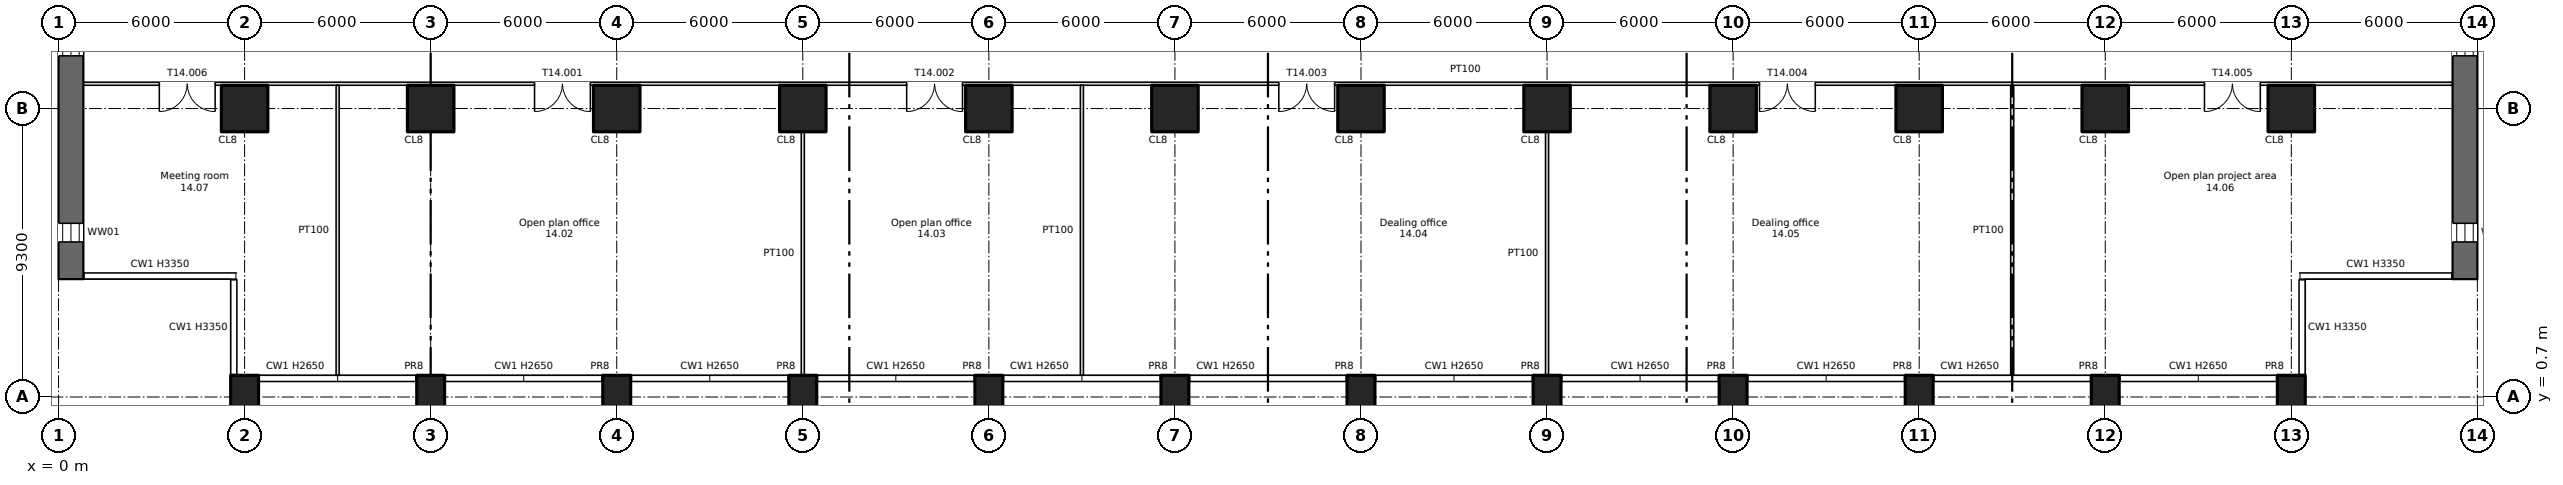
"""IFC4 building model, lengths in metres.
Left out: names, types, materials, properties, quantities, classifications, styles, units other than length and angle.
Written with IfcOpenShell. Run it as: python <this file> out.ifc"""

import sys

from ifc_helpers import new_model, si_unit, direction, frame, frame_2d, origin, origin_2d, place, context, subcontext, project, spatial, rectangle, extrude, element, fill, save


model = new_model("IFC4")
c1 = context("Model", 3, precision=1e-05, world=origin(), true_north=direction((0.0, 1.0)))
c2 = subcontext(c1, "Body", "Model", "MODEL_VIEW")
j1 = project(units=[si_unit("LENGTHUNIT", "METRE"), si_unit("PLANEANGLEUNIT", "RADIAN")], contexts=[c1])
p1 = place(None, origin())
s1 = spatial("IfcSite", under=j1, at=p1, CompositionType="ELEMENT")
p2 = place(p1, origin())
s2 = spatial("IfcBuilding", under=s1, at=p2, CompositionType="ELEMENT")
p3 = place(p2, frame((0.0, 0.0, 78.75)))
s3 = spatial("IfcBuildingStorey", under=s2, at=p3, CompositionType="ELEMENT", Elevation=78.75)
for number, where, z_axis, x_axis in (
    (1, (6.0, 0.7, -0.4), (0.0, 0.0, 1.0), (1.0, 0.0, 0.0)),
    (2, (12.0, 0.7, -0.4), (0.0, 0.0, 1.0), (1.0, 0.0, 0.0)),
    (3, (18.0, 0.7, -0.4), (0.0, 0.0, 1.0), (1.0, 0.0, 0.0)),
    (4, (24.0, 0.7, -0.4), (0.0, 0.0, 1.0), (1.0, 0.0, 0.0)),
    (5, (30.0, 0.7, -0.4), (0.0, 0.0, 1.0), (1.0, 0.0, 0.0)),
    (6, (36.0, 0.7, -0.4), (0.0, 0.0, 1.0), (1.0, 0.0, 0.0)),
    (7, (42.0, 0.7, -0.4), (0.0, 0.0, 1.0), (1.0, 0.0, 0.0)),
    (8, (48.0, 0.7, -0.4), (0.0, 0.0, 1.0), (1.0, 0.0, 0.0)),
    (9, (54.0, 0.7, -0.4), (0.0, 0.0, 1.0), (1.0, 0.0, 0.0)),
    (10, (60.0, 0.7, -0.4), (0.0, 0.0, 1.0), (1.0, 0.0, 0.0)),
    (11, (66.0, 0.7, -0.4), (0.0, 0.0, 1.0), (1.0, 0.0, 0.0)),
    (12, (72.0, 0.7, -0.4), (0.0, 0.0, 1.0), (1.0, 0.0, 0.0)),
):
    element("IfcColumn", number, at=place(p3, frame(where, z_axis=z_axis, x_axis=x_axis)), inside=s3, PredefinedType="COLUMN", context=c2, shape_type="SweptSolid", body=[
        extrude(rectangle(XDim=0.9, YDim=1.4, at=origin_2d()), origin(), (0.0, 0.0, 1.0), 3.75),
    ])
for number, where, z_axis, x_axis in (
    (13, (6.0, 10.0, 0.0), (0.0, 0.0, 1.0), (1.0, 0.0, 0.0)),
    (14, (12.0, 10.0, 0.0), (0.0, 0.0, 1.0), (1.0, 0.0, 0.0)),
    (15, (18.0, 10.0, 0.0), (0.0, 0.0, 1.0), (1.0, 0.0, 0.0)),
    (16, (24.0, 10.0, 0.0), (0.0, 0.0, 1.0), (1.0, 0.0, 0.0)),
    (17, (30.0, 10.0, 0.0), (0.0, 0.0, 1.0), (1.0, 0.0, 0.0)),
    (18, (36.0, 10.0, 0.0), (0.0, 0.0, 1.0), (1.0, 0.0, 0.0)),
    (19, (42.0, 10.0, 0.0), (0.0, 0.0, 1.0), (1.0, 0.0, 0.0)),
    (20, (48.0, 10.0, 0.0), (0.0, 0.0, 1.0), (1.0, 0.0, 0.0)),
    (21, (54.0, 10.0, 0.0), (0.0, 0.0, 1.0), (1.0, 0.0, 0.0)),
    (22, (60.0, 10.0, 0.0), (0.0, 0.0, 1.0), (1.0, 0.0, 0.0)),
    (23, (66.0, 10.0, 0.0), (0.0, 0.0, 1.0), (1.0, 0.0, 0.0)),
    (24, (72.0, 10.0, 0.0), (0.0, 0.0, 1.0), (1.0, 0.0, 0.0)),
):
    element("IfcColumn", number, at=place(p3, frame(where, z_axis=z_axis, x_axis=x_axis)), inside=s3, PredefinedType="COLUMN", context=c2, shape_type="SweptSolid", body=[
        extrude(rectangle(XDim=1.5, YDim=1.5, at=origin_2d()), origin(), (0.0, 0.0, 1.0), 3.35),
    ])
p4 = place(p3, frame((0.4, 4.5, 0.0), z_axis=(0.0, 0.0, 1.0), x_axis=(0.0, 1.0, 0.0)))
e25 = element("IfcWall", 25, at=p4, inside=s3, PredefinedType="SHEAR", context=c2, shape_type="SweptSolid", body=[
    extrude(rectangle(XDim=37.0, YDim=0.8, at=frame_2d((18.5, 0.0))), origin(), (0.0, 0.0, 1.0), 3.35),
])
p5 = place(p4, frame((1.2, 0.0, 0.6)))
e26 = element("IfcOpeningElement", 26, at=p5, cuts=e25, PredefinedType="OPENING", context=c2, shape_type="SweptSolid", body=[
    extrude(rectangle(XDim=0.6, YDim=2.4, at=frame_2d((0.3, 1.2))), frame((0.0, 0.41, 0.0), z_axis=(0.0, -1.0, 0.0), x_axis=(1.0, 0.0, 0.0)), (0.0, 0.0, 1.0), 0.82),
])
p6 = place(p4, frame((7.2, 0.0, 0.6)))
e27 = element("IfcOpeningElement", 27, at=p6, cuts=e25, PredefinedType="OPENING", context=c2, shape_type="SweptSolid", body=[
    extrude(rectangle(XDim=0.6, YDim=2.4, at=frame_2d((0.3, 1.2))), frame((0.0, 0.41, 0.0), z_axis=(0.0, -1.0, 0.0), x_axis=(1.0, 0.0, 0.0)), (0.0, 0.0, 1.0), 0.82),
])
p7 = place(p4, frame((13.2, 0.0, 0.6)))
e28 = element("IfcOpeningElement", 28, at=p7, cuts=e25, PredefinedType="OPENING", context=c2, shape_type="SweptSolid", body=[
    extrude(rectangle(XDim=0.6, YDim=2.4, at=frame_2d((0.3, 1.2))), frame((0.0, 0.41, 0.0), z_axis=(0.0, -1.0, 0.0), x_axis=(1.0, 0.0, 0.0)), (0.0, 0.0, 1.0), 0.82),
])
p8 = place(p4, frame((19.2, 0.0, 0.6)))
e29 = element("IfcOpeningElement", 29, at=p8, cuts=e25, PredefinedType="OPENING", context=c2, shape_type="SweptSolid", body=[
    extrude(rectangle(XDim=0.6, YDim=2.4, at=frame_2d((0.3, 1.2))), frame((0.0, 0.41, 0.0), z_axis=(0.0, -1.0, 0.0), x_axis=(1.0, 0.0, 0.0)), (0.0, 0.0, 1.0), 0.82),
])
p9 = place(p3, frame((77.6, 4.5, 0.0), z_axis=(0.0, 0.0, 1.0), x_axis=(0.0, 1.0, 0.0)))
e30 = element("IfcWall", 30, at=p9, inside=s3, PredefinedType="SHEAR", context=c2, shape_type="SweptSolid", body=[
    extrude(rectangle(XDim=37.0, YDim=0.8, at=frame_2d((18.5, 0.0))), origin(), (0.0, 0.0, 1.0), 3.35),
])
p10 = place(p9, frame((1.2, 0.0, 0.6)))
e31 = element("IfcOpeningElement", 31, at=p10, cuts=e30, PredefinedType="OPENING", context=c2, shape_type="SweptSolid", body=[
    extrude(rectangle(XDim=0.6, YDim=2.4, at=frame_2d((0.3, 1.2))), frame((0.0, 0.41, 0.0), z_axis=(0.0, -1.0, 0.0), x_axis=(1.0, 0.0, 0.0)), (0.0, 0.0, 1.0), 0.82),
])
p11 = place(p9, frame((7.2, 0.0, 0.6)))
e32 = element("IfcOpeningElement", 32, at=p11, cuts=e30, PredefinedType="OPENING", context=c2, shape_type="SweptSolid", body=[
    extrude(rectangle(XDim=0.6, YDim=2.4, at=frame_2d((0.3, 1.2))), frame((0.0, 0.41, 0.0), z_axis=(0.0, -1.0, 0.0), x_axis=(1.0, 0.0, 0.0)), (0.0, 0.0, 1.0), 0.82),
])
p12 = place(p9, frame((13.2, 0.0, 0.6)))
e33 = element("IfcOpeningElement", 33, at=p12, cuts=e30, PredefinedType="OPENING", context=c2, shape_type="SweptSolid", body=[
    extrude(rectangle(XDim=0.6, YDim=2.4, at=frame_2d((0.3, 1.2))), frame((0.0, 0.41, 0.0), z_axis=(0.0, -1.0, 0.0), x_axis=(1.0, 0.0, 0.0)), (0.0, 0.0, 1.0), 0.82),
])
p13 = place(p9, frame((19.2, 0.0, 0.6)))
e34 = element("IfcOpeningElement", 34, at=p13, cuts=e30, PredefinedType="OPENING", context=c2, shape_type="SweptSolid", body=[
    extrude(rectangle(XDim=0.6, YDim=2.4, at=frame_2d((0.3, 1.2))), frame((0.0, 0.41, 0.0), z_axis=(0.0, -1.0, 0.0), x_axis=(1.0, 0.0, 0.0)), (0.0, 0.0, 1.0), 0.82),
])
p14 = place(p9, frame((25.2, 0.0, 0.6)))
e35 = element("IfcOpeningElement", 35, at=p14, cuts=e30, PredefinedType="OPENING", context=c2, shape_type="SweptSolid", body=[
    extrude(rectangle(XDim=0.6, YDim=2.4, at=frame_2d((0.3, 1.2))), frame((0.0, 0.41, 0.0), z_axis=(0.0, -1.0, 0.0), x_axis=(1.0, 0.0, 0.0)), (0.0, 0.0, 1.0), 0.82),
])
p15 = place(p9, frame((31.2, 0.0, 0.6)))
e36 = element("IfcOpeningElement", 36, at=p15, cuts=e30, PredefinedType="OPENING", context=c2, shape_type="SweptSolid", body=[
    extrude(rectangle(XDim=0.6, YDim=2.4, at=frame_2d((0.3, 1.2))), frame((0.0, 0.41, 0.0), z_axis=(0.0, -1.0, 0.0), x_axis=(1.0, 0.0, 0.0)), (0.0, 0.0, 1.0), 0.82),
])
p16 = place(p3, frame((0.8, 10.8, 0.0), z_axis=(0.0, 0.0, 1.0), x_axis=(1.0, 0.0, 0.0)))
e37 = element("IfcWall", 37, at=p16, inside=s3, PredefinedType="PARTITIONING", context=c2, shape_type="SweptSolid", body=[
    extrude(rectangle(XDim=76.4, YDim=0.1, at=frame_2d((38.2, 0.0))), origin(), (0.0, 0.0, 1.0), 3.35),
])
p17 = place(p16, frame((14.55, 0.0, 0.0)))
e38 = element("IfcOpeningElement", 38, at=p17, cuts=e37, PredefinedType="OPENING", context=c2, shape_type="SweptSolid", body=[
    extrude(rectangle(XDim=1.8, YDim=2.1, at=frame_2d((0.9, 1.05))), frame((0.0, 0.06, 0.0), z_axis=(0.0, -1.0, 0.0), x_axis=(1.0, 0.0, 0.0)), (0.0, 0.0, 1.0), 0.12),
])
p18 = place(p16, frame((26.55, 0.0, 0.0)))
e39 = element("IfcOpeningElement", 39, at=p18, cuts=e37, PredefinedType="OPENING", context=c2, shape_type="SweptSolid", body=[
    extrude(rectangle(XDim=1.8, YDim=2.1, at=frame_2d((0.9, 1.05))), frame((0.0, 0.06, 0.0), z_axis=(0.0, -1.0, 0.0), x_axis=(1.0, 0.0, 0.0)), (0.0, 0.0, 1.0), 0.12),
])
p19 = place(p16, frame((38.55, 0.0, 0.0)))
e40 = element("IfcOpeningElement", 40, at=p19, cuts=e37, PredefinedType="OPENING", context=c2, shape_type="SweptSolid", body=[
    extrude(rectangle(XDim=1.8, YDim=2.1, at=frame_2d((0.9, 1.05))), frame((0.0, 0.06, 0.0), z_axis=(0.0, -1.0, 0.0), x_axis=(1.0, 0.0, 0.0)), (0.0, 0.0, 1.0), 0.12),
])
p20 = place(p16, frame((54.05, 0.0, 0.0)))
e41 = element("IfcOpeningElement", 41, at=p20, cuts=e37, PredefinedType="OPENING", context=c2, shape_type="SweptSolid", body=[
    extrude(rectangle(XDim=1.8, YDim=2.1, at=frame_2d((0.9, 1.05))), frame((0.0, 0.06, 0.0), z_axis=(0.0, -1.0, 0.0), x_axis=(1.0, 0.0, 0.0)), (0.0, 0.0, 1.0), 0.12),
])
p21 = place(p16, frame((68.4, 0.0, 0.0)))
e42 = element("IfcOpeningElement", 42, at=p21, cuts=e37, PredefinedType="OPENING", context=c2, shape_type="SweptSolid", body=[
    extrude(rectangle(XDim=1.8, YDim=2.1, at=frame_2d((0.9, 1.05))), frame((0.0, 0.06, 0.0), z_axis=(0.0, -1.0, 0.0), x_axis=(1.0, 0.0, 0.0)), (0.0, 0.0, 1.0), 0.12),
])
p22 = place(p16, frame((2.45, 0.0, 0.0)))
e43 = element("IfcOpeningElement", 43, at=p22, cuts=e37, PredefinedType="OPENING", context=c2, shape_type="SweptSolid", body=[
    extrude(rectangle(XDim=1.8, YDim=2.1, at=frame_2d((0.9, 1.05))), frame((0.0, 0.06, 0.0), z_axis=(0.0, -1.0, 0.0), x_axis=(1.0, 0.0, 0.0)), (0.0, 0.0, 1.0), 0.12),
])
p23 = place(p3, frame((9.0, 1.4, 0.0), z_axis=(0.0, 0.0, 1.0), x_axis=(0.0, 1.0, 0.0)))
e44 = element("IfcWall", 44, at=p23, inside=s3, PredefinedType="PARTITIONING", context=c2, shape_type="SweptSolid", body=[
    extrude(rectangle(XDim=9.35, YDim=0.1, at=frame_2d((4.675, 0.0))), origin(), (0.0, 0.0, 1.0), 3.35),
])
p24 = place(p3, frame((24.0, 1.4, 0.0), z_axis=(0.0, 0.0, 1.0), x_axis=(0.0, 1.0, 0.0)))
e45 = element("IfcWall", 45, at=p24, inside=s3, PredefinedType="PARTITIONING", context=c2, shape_type="SweptSolid", body=[
    extrude(rectangle(XDim=7.85, YDim=0.1, at=frame_2d((3.925, 0.0))), origin(), (0.0, 0.0, 1.0), 3.35),
])
p25 = place(p3, frame((33.0, 1.4, 0.0), z_axis=(0.0, 0.0, 1.0), x_axis=(0.0, 1.0, 0.0)))
e46 = element("IfcWall", 46, at=p25, inside=s3, PredefinedType="PARTITIONING", context=c2, shape_type="SweptSolid", body=[
    extrude(rectangle(XDim=9.35, YDim=0.1, at=frame_2d((4.675, 0.0))), origin(), (0.0, 0.0, 1.0), 3.35),
])
p26 = place(p3, frame((48.0, 1.4, 0.0), z_axis=(0.0, 0.0, 1.0), x_axis=(0.0, 1.0, 0.0)))
e47 = element("IfcWall", 47, at=p26, inside=s3, PredefinedType="PARTITIONING", context=c2, shape_type="SweptSolid", body=[
    extrude(rectangle(XDim=7.85, YDim=0.1, at=frame_2d((3.925, 0.0))), origin(), (0.0, 0.0, 1.0), 3.35),
])
p27 = place(p3, frame((63.0, 1.4, 0.0), z_axis=(0.0, 0.0, 1.0), x_axis=(0.0, 1.0, 0.0)))
e48 = element("IfcWall", 48, at=p27, inside=s3, PredefinedType="PARTITIONING", context=c2, shape_type="SweptSolid", body=[
    extrude(rectangle(XDim=9.35, YDim=0.1, at=frame_2d((4.675, 0.0))), origin(), (0.0, 0.0, 1.0), 3.35),
])
p28 = place(p5, origin())
e49 = element("IfcWindow", 49, at=p28, inside=s3, PartitioningType="SINGLE_PANEL", PredefinedType="WINDOW", context=c2, shape_type="SweptSolid", body=[
    extrude(rectangle(XDim=0.6, YDim=2.4, at=frame_2d((0.3, 1.2))), frame((0.0, 0.03, 0.0), z_axis=(0.0, -1.0, 0.0), x_axis=(1.0, 0.0, 0.0)), (0.0, 0.0, 1.0), 0.06),
])
fill(e26, e49)
p29 = place(p6, origin())
e50 = element("IfcWindow", 50, at=p29, inside=s3, PartitioningType="SINGLE_PANEL", PredefinedType="WINDOW", context=c2, shape_type="SweptSolid", body=[
    extrude(rectangle(XDim=0.6, YDim=2.4, at=frame_2d((0.3, 1.2))), frame((0.0, 0.03, 0.0), z_axis=(0.0, -1.0, 0.0), x_axis=(1.0, 0.0, 0.0)), (0.0, 0.0, 1.0), 0.06),
])
fill(e27, e50)
p30 = place(p10, origin())
e51 = element("IfcWindow", 51, at=p30, inside=s3, PartitioningType="SINGLE_PANEL", PredefinedType="WINDOW", context=c2, shape_type="SweptSolid", body=[
    extrude(rectangle(XDim=0.6, YDim=2.4, at=frame_2d((0.3, 1.2))), frame((0.0, 0.03, 0.0), z_axis=(0.0, -1.0, 0.0), x_axis=(1.0, 0.0, 0.0)), (0.0, 0.0, 1.0), 0.06),
])
fill(e31, e51)
p31 = place(p11, origin())
e52 = element("IfcWindow", 52, at=p31, inside=s3, PartitioningType="SINGLE_PANEL", PredefinedType="WINDOW", context=c2, shape_type="SweptSolid", body=[
    extrude(rectangle(XDim=0.6, YDim=2.4, at=frame_2d((0.3, 1.2))), frame((0.0, 0.03, 0.0), z_axis=(0.0, -1.0, 0.0), x_axis=(1.0, 0.0, 0.0)), (0.0, 0.0, 1.0), 0.06),
])
fill(e32, e52)
p32 = place(p17, origin())
e53 = element("IfcDoor", 53, at=p32, inside=s3, OperationType="DOUBLE_DOOR_SINGLE_SWING", PredefinedType="DOOR", context=c2, shape_type="SweptSolid", body=[
    extrude(rectangle(XDim=1.8, YDim=2.1, at=frame_2d((0.9, 1.05))), frame((0.0, 0.025, 0.0), z_axis=(0.0, -1.0, 0.0), x_axis=(1.0, 0.0, 0.0)), (0.0, 0.0, 1.0), 0.05),
])
fill(e38, e53)
p33 = place(p18, origin())
e54 = element("IfcDoor", 54, at=p33, inside=s3, OperationType="DOUBLE_DOOR_SINGLE_SWING", PredefinedType="DOOR", context=c2, shape_type="SweptSolid", body=[
    extrude(rectangle(XDim=1.8, YDim=2.1, at=frame_2d((0.9, 1.05))), frame((0.0, 0.025, 0.0), z_axis=(0.0, -1.0, 0.0), x_axis=(1.0, 0.0, 0.0)), (0.0, 0.0, 1.0), 0.05),
])
fill(e39, e54)
p34 = place(p19, origin())
e55 = element("IfcDoor", 55, at=p34, inside=s3, OperationType="DOUBLE_DOOR_SINGLE_SWING", PredefinedType="DOOR", context=c2, shape_type="SweptSolid", body=[
    extrude(rectangle(XDim=1.8, YDim=2.1, at=frame_2d((0.9, 1.05))), frame((0.0, 0.025, 0.0), z_axis=(0.0, -1.0, 0.0), x_axis=(1.0, 0.0, 0.0)), (0.0, 0.0, 1.0), 0.05),
])
fill(e40, e55)
p35 = place(p20, origin())
e56 = element("IfcDoor", 56, at=p35, inside=s3, OperationType="DOUBLE_DOOR_SINGLE_SWING", PredefinedType="DOOR", context=c2, shape_type="SweptSolid", body=[
    extrude(rectangle(XDim=1.8, YDim=2.1, at=frame_2d((0.9, 1.05))), frame((0.0, 0.025, 0.0), z_axis=(0.0, -1.0, 0.0), x_axis=(1.0, 0.0, 0.0)), (0.0, 0.0, 1.0), 0.05),
])
fill(e41, e56)
p36 = place(p21, origin())
e57 = element("IfcDoor", 57, at=p36, inside=s3, OperationType="DOUBLE_DOOR_SINGLE_SWING", PredefinedType="DOOR", context=c2, shape_type="SweptSolid", body=[
    extrude(rectangle(XDim=1.8, YDim=2.1, at=frame_2d((0.9, 1.05))), frame((0.0, 0.025, 0.0), z_axis=(0.0, -1.0, 0.0), x_axis=(1.0, 0.0, 0.0)), (0.0, 0.0, 1.0), 0.05),
])
fill(e42, e57)
p37 = place(p22, origin())
e58 = element("IfcDoor", 58, at=p37, inside=s3, OperationType="DOUBLE_DOOR_SINGLE_SWING", PredefinedType="DOOR", context=c2, shape_type="SweptSolid", body=[
    extrude(rectangle(XDim=1.8, YDim=2.1, at=frame_2d((0.9, 1.05))), frame((0.0, 0.025, 0.0), z_axis=(0.0, -1.0, 0.0), x_axis=(1.0, 0.0, 0.0)), (0.0, 0.0, 1.0), 0.05),
])
fill(e43, e58)
save(model, sys.argv[1])
